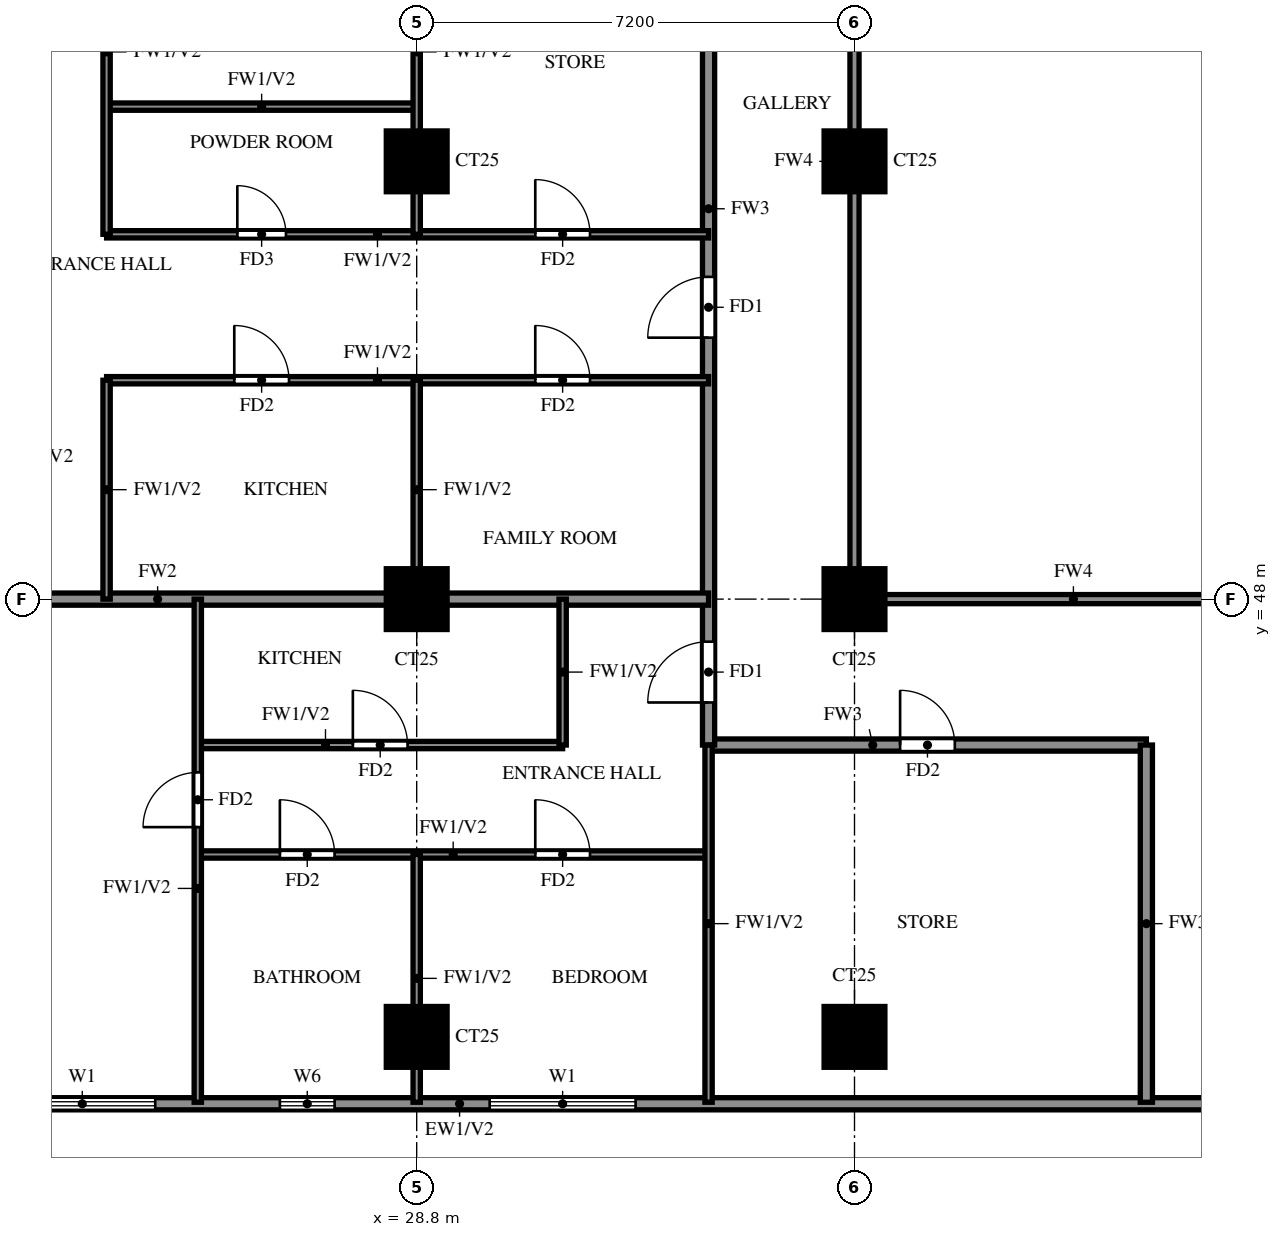
"""IFC4 building model, lengths in metres.
Left out: names, types, materials, properties, quantities, classifications, styles, units other than length and angle.
Written with IfcOpenShell. Run it as: python <this file> out.ifc"""

import sys

from ifc_helpers import new_model, si_unit, direction, frame, frame_2d, origin, origin_2d, place, context, subcontext, project, spatial, rectangle, extrude, source, transform, mapped, element, fill, save


model = new_model("IFC4")
c1 = context("Model", 3, precision=1e-05, world=origin(), true_north=direction((0.0, 1.0)))
c2 = subcontext(c1, "Body", "Model", "MODEL_VIEW")
j1 = project(units=[si_unit("LENGTHUNIT", "METRE"), si_unit("PLANEANGLEUNIT", "RADIAN")], contexts=[c1])
p1 = place(None, origin())
s1 = spatial("IfcSite", under=j1, at=p1, CompositionType="ELEMENT")
p2 = place(p1, origin())
s2 = spatial("IfcBuilding", under=s1, at=p2, CompositionType="ELEMENT")
p3 = place(p2, frame((0.0, 0.0, 143.0)))
s3 = spatial("IfcBuildingStorey", under=s2, at=p3, CompositionType="ELEMENT", Elevation=143.0)
m1 = source(origin(), c2, "Body", "SweptSolid", [
    extrude(rectangle(XDim=1.0, YDim=1.0, at=origin_2d()), origin(), (0.0, 0.0, 1.0), 3.2),
])
for number, where, z_axis, x_axis in (
    (1, (28.8, 40.8, 0.0), (0.0, 0.0, 1.0), (1.0, 0.0, 0.0)),
    (2, (36.0, 40.8, 0.0), (0.0, 0.0, 1.0), (1.0, 0.0, 0.0)),
    (3, (28.8, 48.0, 0.0), (0.0, 0.0, 1.0), (1.0, 0.0, 0.0)),
    (4, (36.0, 48.0, 0.0), (0.0, 0.0, 1.0), (1.0, 0.0, 0.0)),
    (5, (28.8, 55.2, 0.0), (0.0, 0.0, 1.0), (1.0, 0.0, 0.0)),
    (6, (36.0, 55.2, 0.0), (0.0, 0.0, 1.0), (1.0, 0.0, 0.0)),
):
    element("IfcColumn", number, at=place(p3, frame(where, z_axis=z_axis, x_axis=x_axis)), inside=s3, PredefinedType="COLUMN", context=c2, shape_type="MappedRepresentation", body=[
        mapped(m1, transform((0.0, 0.0, 0.0))),
    ])
p4 = place(p3, frame((18.2, 39.7, 0.0), z_axis=(0.0, 0.0, 1.0), x_axis=(1.0, 0.0, 0.0)))
e7 = element("IfcWall", 7, at=p4, inside=s3, PredefinedType="SOLIDWALL", context=c2, shape_type="SweptSolid", body=[
    extrude(rectangle(XDim=23.8, YDim=0.2, at=frame_2d((11.9, 0.0))), origin(), (0.0, 0.0, 1.0), 3.2),
])
p5 = place(p4, frame((0.9, 0.0, 0.6)))
e8 = element("IfcOpeningElement", 8, at=p5, cuts=e7, PredefinedType="OPENING", context=c2, shape_type="SweptSolid", body=[
    extrude(rectangle(XDim=2.4, YDim=2.4, at=frame_2d((1.2, 1.2))), frame((0.0, 0.11, 0.0), z_axis=(0.0, -1.0, 0.0), x_axis=(1.0, 0.0, 0.0)), (0.0, 0.0, 1.0), 0.22),
])
p6 = place(p4, frame((3.9, 0.0, 0.6)))
e9 = element("IfcOpeningElement", 9, at=p6, cuts=e7, PredefinedType="OPENING", context=c2, shape_type="SweptSolid", body=[
    extrude(rectangle(XDim=2.4, YDim=2.4, at=frame_2d((1.2, 1.2))), frame((0.0, 0.11, 0.0), z_axis=(0.0, -1.0, 0.0), x_axis=(1.0, 0.0, 0.0)), (0.0, 0.0, 1.0), 0.22),
])
p7 = place(p4, frame((8.35, 0.0, 1.5)))
e10 = element("IfcOpeningElement", 10, at=p7, cuts=e7, PredefinedType="OPENING", context=c2, shape_type="SweptSolid", body=[
    extrude(rectangle(XDim=0.9, YDim=0.9, at=frame_2d((0.45, 0.45))), frame((0.0, 0.11, 0.0), z_axis=(0.0, -1.0, 0.0), x_axis=(1.0, 0.0, 0.0)), (0.0, 0.0, 1.0), 0.22),
])
p8 = place(p4, frame((11.8, 0.0, 0.6)))
e11 = element("IfcOpeningElement", 11, at=p8, cuts=e7, PredefinedType="OPENING", context=c2, shape_type="SweptSolid", body=[
    extrude(rectangle(XDim=2.4, YDim=2.4, at=frame_2d((1.2, 1.2))), frame((0.0, 0.11, 0.0), z_axis=(0.0, -1.0, 0.0), x_axis=(1.0, 0.0, 0.0)), (0.0, 0.0, 1.0), 0.22),
])
p9 = place(p3, frame((33.6, 45.6, 0.0), z_axis=(0.0, 0.0, 1.0), x_axis=(1.0, 0.0, 0.0)))
e12 = element("IfcWall", 12, at=p9, inside=s3, PredefinedType="SOLIDWALL", context=c2, shape_type="SweptSolid", body=[
    extrude(rectangle(XDim=7.2, YDim=0.2, at=frame_2d((3.6, 0.0))), origin(), (0.0, 0.0, 1.0), 3.2),
])
p10 = place(p9, frame((3.15, 0.0, 0.0)))
e13 = element("IfcOpeningElement", 13, at=p10, cuts=e12, PredefinedType="OPENING", context=c2, shape_type="SweptSolid", body=[
    extrude(rectangle(XDim=0.9, YDim=2.1, at=frame_2d((0.45, 1.05))), frame((0.0, 0.11, 0.0), z_axis=(0.0, -1.0, 0.0), x_axis=(1.0, 0.0, 0.0)), (0.0, 0.0, 1.0), 0.22),
])
p11 = place(p3, frame((33.6, 45.6, 0.0), z_axis=(0.0, 0.0, 1.0), x_axis=(0.0, 1.0, 0.0)))
e14 = element("IfcWall", 14, at=p11, inside=s3, PredefinedType="SOLIDWALL", context=c2, shape_type="SweptSolid", body=[
    extrude(rectangle(XDim=16.8, YDim=0.2, at=frame_2d((8.4, 0.0))), origin(), (0.0, 0.0, 1.0), 3.2),
])
p12 = place(p11, frame((0.7, 0.0, 0.0)))
e15 = element("IfcOpeningElement", 15, at=p12, cuts=e14, PredefinedType="OPENING", context=c2, shape_type="SweptSolid", body=[
    extrude(rectangle(XDim=1.0, YDim=2.1, at=frame_2d((0.5, 1.05))), frame((0.0, 0.11, 0.0), z_axis=(0.0, -1.0, 0.0), x_axis=(1.0, 0.0, 0.0)), (0.0, 0.0, 1.0), 0.22),
])
p13 = place(p11, frame((6.7, 0.0, 0.0)))
e16 = element("IfcOpeningElement", 16, at=p13, cuts=e14, PredefinedType="OPENING", context=c2, shape_type="SweptSolid", body=[
    extrude(rectangle(XDim=1.0, YDim=2.1, at=frame_2d((0.5, 1.05))), frame((0.0, 0.11, 0.0), z_axis=(0.0, -1.0, 0.0), x_axis=(1.0, 0.0, 0.0)), (0.0, 0.0, 1.0), 0.22),
])
p14 = place(p11, frame((15.1, 0.0, 0.0)))
e17 = element("IfcOpeningElement", 17, at=p14, cuts=e14, PredefinedType="OPENING", context=c2, shape_type="SweptSolid", body=[
    extrude(rectangle(XDim=1.0, YDim=2.1, at=frame_2d((0.5, 1.05))), frame((0.0, 0.11, 0.0), z_axis=(0.0, -1.0, 0.0), x_axis=(1.0, 0.0, 0.0)), (0.0, 0.0, 1.0), 0.22),
])
p15 = place(p3, frame((40.8, 39.725, 0.0), z_axis=(0.0, 0.0, 1.0), x_axis=(0.0, 1.0, 0.0)))
e18 = element("IfcWall", 18, at=p15, inside=s3, PredefinedType="SOLIDWALL", context=c2, shape_type="SweptSolid", body=[
    extrude(rectangle(XDim=5.875, YDim=0.2, at=frame_2d((2.938, 0.0))), origin(), (0.0, 0.0, 1.0), 3.2),
])
p16 = place(p3, frame((14.525, 48.0, 0.0), z_axis=(0.0, 0.0, 1.0), x_axis=(1.0, 0.0, 0.0)))
e19 = element("IfcWall", 19, at=p16, inside=s3, PredefinedType="SOLIDWALL", context=c2, shape_type="SweptSolid", body=[
    extrude(rectangle(XDim=19.075, YDim=0.2, at=frame_2d((9.538, 0.0))), origin(), (0.0, 0.0, 1.0), 3.2),
])
p17 = place(p3, frame((25.2, 43.8, 0.0), z_axis=(0.0, 0.0, 1.0), x_axis=(1.0, 0.0, 0.0)))
e20 = element("IfcWall", 20, at=p17, inside=s3, PredefinedType="PARTITIONING", context=c2, shape_type="SweptSolid", body=[
    extrude(rectangle(XDim=8.4, YDim=0.12, at=frame_2d((4.2, 0.0))), origin(), (0.0, 0.0, 1.0), 3.2),
])
p18 = place(p17, frame((1.35, 0.0, 0.0)))
e21 = element("IfcOpeningElement", 21, at=p18, cuts=e20, PredefinedType="OPENING", context=c2, shape_type="SweptSolid", body=[
    extrude(rectangle(XDim=0.9, YDim=2.1, at=frame_2d((0.45, 1.05))), frame((0.0, 0.07, 0.0), z_axis=(0.0, -1.0, 0.0), x_axis=(1.0, 0.0, 0.0)), (0.0, 0.0, 1.0), 0.14),
])
p19 = place(p17, frame((5.55, 0.0, 0.0)))
e22 = element("IfcOpeningElement", 22, at=p19, cuts=e20, PredefinedType="OPENING", context=c2, shape_type="SweptSolid", body=[
    extrude(rectangle(XDim=0.9, YDim=2.1, at=frame_2d((0.45, 1.05))), frame((0.0, 0.07, 0.0), z_axis=(0.0, -1.0, 0.0), x_axis=(1.0, 0.0, 0.0)), (0.0, 0.0, 1.0), 0.14),
])
p20 = place(p3, frame((25.2, 45.6, 0.0), z_axis=(0.0, 0.0, 1.0), x_axis=(1.0, 0.0, 0.0)))
e23 = element("IfcWall", 23, at=p20, inside=s3, PredefinedType="PARTITIONING", context=c2, shape_type="SweptSolid", body=[
    extrude(rectangle(XDim=6.0, YDim=0.12, at=frame_2d((3.0, 0.0))), origin(), (0.0, 0.0, 1.0), 3.2),
])
p21 = place(p20, frame((2.55, 0.0, 0.0)))
e24 = element("IfcOpeningElement", 24, at=p21, cuts=e23, PredefinedType="OPENING", context=c2, shape_type="SweptSolid", body=[
    extrude(rectangle(XDim=0.9, YDim=2.1, at=frame_2d((0.45, 1.05))), frame((0.0, 0.07, 0.0), z_axis=(0.0, -1.0, 0.0), x_axis=(1.0, 0.0, 0.0)), (0.0, 0.0, 1.0), 0.14),
])
p22 = place(p3, frame((23.7, 51.6, 0.0), z_axis=(0.0, 0.0, 1.0), x_axis=(1.0, 0.0, 0.0)))
e25 = element("IfcWall", 25, at=p22, inside=s3, PredefinedType="PARTITIONING", context=c2, shape_type="SweptSolid", body=[
    extrude(rectangle(XDim=9.9, YDim=0.12, at=frame_2d((4.95, 0.0))), origin(), (0.0, 0.0, 1.0), 3.2),
])
p23 = place(p22, frame((2.1, 0.0, 0.0)))
e26 = element("IfcOpeningElement", 26, at=p23, cuts=e25, PredefinedType="OPENING", context=c2, shape_type="SweptSolid", body=[
    extrude(rectangle(XDim=0.9, YDim=2.1, at=frame_2d((0.45, 1.05))), frame((0.0, 0.07, 0.0), z_axis=(0.0, -1.0, 0.0), x_axis=(1.0, 0.0, 0.0)), (0.0, 0.0, 1.0), 0.14),
])
p24 = place(p22, frame((7.05, 0.0, 0.0)))
e27 = element("IfcOpeningElement", 27, at=p24, cuts=e25, PredefinedType="OPENING", context=c2, shape_type="SweptSolid", body=[
    extrude(rectangle(XDim=0.9, YDim=2.1, at=frame_2d((0.45, 1.05))), frame((0.0, 0.07, 0.0), z_axis=(0.0, -1.0, 0.0), x_axis=(1.0, 0.0, 0.0)), (0.0, 0.0, 1.0), 0.14),
])
p25 = place(p3, frame((23.7, 54.0, 0.0), z_axis=(0.0, 0.0, 1.0), x_axis=(1.0, 0.0, 0.0)))
e28 = element("IfcWall", 28, at=p25, inside=s3, PredefinedType="PARTITIONING", context=c2, shape_type="SweptSolid", body=[
    extrude(rectangle(XDim=9.9, YDim=0.12, at=frame_2d((4.95, 0.0))), origin(), (0.0, 0.0, 1.0), 3.2),
])
p26 = place(p25, frame((2.15, 0.0, 0.0)))
e29 = element("IfcOpeningElement", 29, at=p26, cuts=e28, PredefinedType="OPENING", context=c2, shape_type="SweptSolid", body=[
    extrude(rectangle(XDim=0.8, YDim=2.1, at=frame_2d((0.4, 1.05))), frame((0.0, 0.07, 0.0), z_axis=(0.0, -1.0, 0.0), x_axis=(1.0, 0.0, 0.0)), (0.0, 0.0, 1.0), 0.14),
])
p27 = place(p25, frame((7.05, 0.0, 0.0)))
e30 = element("IfcOpeningElement", 30, at=p27, cuts=e28, PredefinedType="OPENING", context=c2, shape_type="SweptSolid", body=[
    extrude(rectangle(XDim=0.9, YDim=2.1, at=frame_2d((0.45, 1.05))), frame((0.0, 0.07, 0.0), z_axis=(0.0, -1.0, 0.0), x_axis=(1.0, 0.0, 0.0)), (0.0, 0.0, 1.0), 0.14),
])
p28 = place(p3, frame((23.7, 56.1, 0.0), z_axis=(0.0, 0.0, 1.0), x_axis=(1.0, 0.0, 0.0)))
e31 = element("IfcWall", 31, at=p28, inside=s3, PredefinedType="PARTITIONING", context=c2, shape_type="SweptSolid", body=[
    extrude(rectangle(XDim=5.1, YDim=0.12, at=frame_2d((2.55, 0.0))), origin(), (0.0, 0.0, 1.0), 3.2),
])
p29 = place(p3, frame((23.7, 48.0, 0.0), z_axis=(0.0, 0.0, 1.0), x_axis=(0.0, 1.0, 0.0)))
e32 = element("IfcWall", 32, at=p29, inside=s3, PredefinedType="PARTITIONING", context=c2, shape_type="SweptSolid", body=[
    extrude(rectangle(XDim=3.6, YDim=0.12, at=frame_2d((1.8, 0.0))), origin(), (0.0, 0.0, 1.0), 3.2),
])
p30 = place(p3, frame((23.7, 54.0, 0.0), z_axis=(0.0, 0.0, 1.0), x_axis=(0.0, 1.0, 0.0)))
e33 = element("IfcWall", 33, at=p30, inside=s3, PredefinedType="PARTITIONING", context=c2, shape_type="SweptSolid", body=[
    extrude(rectangle(XDim=6.0, YDim=0.12, at=frame_2d((3.0, 0.0))), origin(), (0.0, 0.0, 1.0), 3.2),
])
p31 = place(p30, frame((3.65, 0.0, 0.0)))
e34 = element("IfcOpeningElement", 34, at=p31, cuts=e33, PredefinedType="OPENING", context=c2, shape_type="SweptSolid", body=[
    extrude(rectangle(XDim=0.8, YDim=2.1, at=frame_2d((0.4, 1.05))), frame((0.0, 0.07, 0.0), z_axis=(0.0, -1.0, 0.0), x_axis=(1.0, 0.0, 0.0)), (0.0, 0.0, 1.0), 0.14),
])
p32 = place(p3, frame((25.2, 39.725, 0.0), z_axis=(0.0, 0.0, 1.0), x_axis=(0.0, 1.0, 0.0)))
e35 = element("IfcWall", 35, at=p32, inside=s3, PredefinedType="PARTITIONING", context=c2, shape_type="SweptSolid", body=[
    extrude(rectangle(XDim=8.275, YDim=0.12, at=frame_2d((4.137, 0.0))), origin(), (0.0, 0.0, 1.0), 3.2),
])
p33 = place(p32, frame((4.525, 0.0, 0.0)))
e36 = element("IfcOpeningElement", 36, at=p33, cuts=e35, PredefinedType="OPENING", context=c2, shape_type="SweptSolid", body=[
    extrude(rectangle(XDim=0.9, YDim=2.1, at=frame_2d((0.45, 1.05))), frame((0.0, 0.07, 0.0), z_axis=(0.0, -1.0, 0.0), x_axis=(1.0, 0.0, 0.0)), (0.0, 0.0, 1.0), 0.14),
])
p34 = place(p3, frame((28.8, 39.725, 0.0), z_axis=(0.0, 0.0, 1.0), x_axis=(0.0, 1.0, 0.0)))
e37 = element("IfcWall", 37, at=p34, inside=s3, PredefinedType="PARTITIONING", context=c2, shape_type="SweptSolid", body=[
    extrude(rectangle(XDim=4.075, YDim=0.12, at=frame_2d((2.038, 0.0))), origin(), (0.0, 0.0, 1.0), 3.2),
])
p35 = place(p3, frame((28.8, 48.0, 0.0), z_axis=(0.0, 0.0, 1.0), x_axis=(0.0, 1.0, 0.0)))
e38 = element("IfcWall", 38, at=p35, inside=s3, PredefinedType="PARTITIONING", context=c2, shape_type="SweptSolid", body=[
    extrude(rectangle(XDim=3.6, YDim=0.12, at=frame_2d((1.8, 0.0))), origin(), (0.0, 0.0, 1.0), 3.2),
])
p36 = place(p3, frame((28.8, 54.0, 0.0), z_axis=(0.0, 0.0, 1.0), x_axis=(0.0, 1.0, 0.0)))
e39 = element("IfcWall", 39, at=p36, inside=s3, PredefinedType="PARTITIONING", context=c2, shape_type="SweptSolid", body=[
    extrude(rectangle(XDim=6.0, YDim=0.12, at=frame_2d((3.0, 0.0))), origin(), (0.0, 0.0, 1.0), 3.2),
])
p37 = place(p3, frame((31.2, 45.6, 0.0), z_axis=(0.0, 0.0, 1.0), x_axis=(0.0, 1.0, 0.0)))
e40 = element("IfcWall", 40, at=p37, inside=s3, PredefinedType="PARTITIONING", context=c2, shape_type="SweptSolid", body=[
    extrude(rectangle(XDim=2.4, YDim=0.12, at=frame_2d((1.2, 0.0))), origin(), (0.0, 0.0, 1.0), 3.2),
])
p38 = place(p3, frame((33.6, 39.725, 0.0), z_axis=(0.0, 0.0, 1.0), x_axis=(0.0, 1.0, 0.0)))
e41 = element("IfcWall", 41, at=p38, inside=s3, PredefinedType="PARTITIONING", context=c2, shape_type="SweptSolid", body=[
    extrude(rectangle(XDim=5.875, YDim=0.12, at=frame_2d((2.938, 0.0))), origin(), (0.0, 0.0, 1.0), 3.2),
])
p39 = place(p3, frame((36.0, 48.0, 0.0), z_axis=(0.0, 0.0, 1.0), x_axis=(1.0, 0.0, 0.0)))
e42 = element("IfcWall", 42, at=p39, inside=s3, PredefinedType="SOLIDWALL", context=c2, shape_type="SweptSolid", body=[
    extrude(rectangle(XDim=7.2, YDim=0.15, at=frame_2d((3.6, 0.0))), origin(), (0.0, 0.0, 1.0), 2.3),
])
p40 = place(p3, frame((36.0, 48.0, 0.0), z_axis=(0.0, 0.0, 1.0), x_axis=(0.0, 1.0, 0.0)))
e43 = element("IfcWall", 43, at=p40, inside=s3, PredefinedType="SOLIDWALL", context=c2, shape_type="SweptSolid", body=[
    extrude(rectangle(XDim=14.4, YDim=0.15, at=frame_2d((7.2, 0.0))), origin(), (0.0, 0.0, 1.0), 2.3),
])
p41 = place(p6, origin())
e44 = element("IfcWindow", 44, at=p41, inside=s3, PartitioningType="DOUBLE_PANEL_VERTICAL", PredefinedType="WINDOW", context=c2, shape_type="SweptSolid", body=[
    extrude(rectangle(XDim=2.4, YDim=2.4, at=frame_2d((1.2, 1.2))), frame((0.0, 0.03, 0.0), z_axis=(0.0, -1.0, 0.0), x_axis=(1.0, 0.0, 0.0)), (0.0, 0.0, 1.0), 0.06),
])
fill(e9, e44)
p42 = place(p7, origin())
e45 = element("IfcWindow", 45, at=p42, inside=s3, PartitioningType="SINGLE_PANEL", PredefinedType="WINDOW", context=c2, shape_type="SweptSolid", body=[
    extrude(rectangle(XDim=0.9, YDim=0.9, at=frame_2d((0.45, 0.45))), frame((0.0, 0.03, 0.0), z_axis=(0.0, -1.0, 0.0), x_axis=(1.0, 0.0, 0.0)), (0.0, 0.0, 1.0), 0.06),
])
fill(e10, e45)
p43 = place(p8, origin())
e46 = element("IfcWindow", 46, at=p43, inside=s3, PartitioningType="DOUBLE_PANEL_VERTICAL", PredefinedType="WINDOW", context=c2, shape_type="SweptSolid", body=[
    extrude(rectangle(XDim=2.4, YDim=2.4, at=frame_2d((1.2, 1.2))), frame((0.0, 0.03, 0.0), z_axis=(0.0, -1.0, 0.0), x_axis=(1.0, 0.0, 0.0)), (0.0, 0.0, 1.0), 0.06),
])
fill(e11, e46)
p44 = place(p12, origin())
e47 = element("IfcDoor", 47, at=p44, inside=s3, OperationType="SINGLE_SWING_LEFT", PredefinedType="DOOR", context=c2, shape_type="SweptSolid", body=[
    extrude(rectangle(XDim=1.0, YDim=2.1, at=frame_2d((0.5, 1.05))), frame((0.0, 0.025, 0.0), z_axis=(0.0, -1.0, 0.0), x_axis=(1.0, 0.0, 0.0)), (0.0, 0.0, 1.0), 0.05),
])
fill(e15, e47)
p45 = place(p33, origin())
e48 = element("IfcDoor", 48, at=p45, inside=s3, OperationType="SINGLE_SWING_LEFT", PredefinedType="DOOR", context=c2, shape_type="SweptSolid", body=[
    extrude(rectangle(XDim=0.9, YDim=2.1, at=frame_2d((0.45, 1.05))), frame((0.0, 0.025, 0.0), z_axis=(0.0, -1.0, 0.0), x_axis=(1.0, 0.0, 0.0)), (0.0, 0.0, 1.0), 0.05),
])
fill(e36, e48)
p46 = place(p18, origin())
e49 = element("IfcDoor", 49, at=p46, inside=s3, OperationType="SINGLE_SWING_RIGHT", PredefinedType="DOOR", context=c2, shape_type="SweptSolid", body=[
    extrude(rectangle(XDim=0.9, YDim=2.1, at=frame_2d((0.45, 1.05))), frame((0.0, 0.025, 0.0), z_axis=(0.0, -1.0, 0.0), x_axis=(1.0, 0.0, 0.0)), (0.0, 0.0, 1.0), 0.05),
])
fill(e21, e49)
p47 = place(p19, origin())
e50 = element("IfcDoor", 50, at=p47, inside=s3, OperationType="SINGLE_SWING_LEFT", PredefinedType="DOOR", context=c2, shape_type="SweptSolid", body=[
    extrude(rectangle(XDim=0.9, YDim=2.1, at=frame_2d((0.45, 1.05))), frame((0.0, 0.025, 0.0), z_axis=(0.0, -1.0, 0.0), x_axis=(1.0, 0.0, 0.0)), (0.0, 0.0, 1.0), 0.05),
])
fill(e22, e50)
p48 = place(p21, origin())
e51 = element("IfcDoor", 51, at=p48, inside=s3, OperationType="SINGLE_SWING_LEFT", PredefinedType="DOOR", context=c2, shape_type="SweptSolid", body=[
    extrude(rectangle(XDim=0.9, YDim=2.1, at=frame_2d((0.45, 1.05))), frame((0.0, 0.025, 0.0), z_axis=(0.0, -1.0, 0.0), x_axis=(1.0, 0.0, 0.0)), (0.0, 0.0, 1.0), 0.05),
])
fill(e24, e51)
p49 = place(p10, origin())
e52 = element("IfcDoor", 52, at=p49, inside=s3, OperationType="SINGLE_SWING_RIGHT", PredefinedType="DOOR", context=c2, shape_type="SweptSolid", body=[
    extrude(rectangle(XDim=0.9, YDim=2.1, at=frame_2d((0.45, 1.05))), frame((0.0, 0.025, 0.0), z_axis=(0.0, -1.0, 0.0), x_axis=(1.0, 0.0, 0.0)), (0.0, 0.0, 1.0), 0.05),
])
fill(e13, e52)
p50 = place(p13, origin())
e53 = element("IfcDoor", 53, at=p50, inside=s3, OperationType="SINGLE_SWING_LEFT", PredefinedType="DOOR", context=c2, shape_type="SweptSolid", body=[
    extrude(rectangle(XDim=1.0, YDim=2.1, at=frame_2d((0.5, 1.05))), frame((0.0, 0.025, 0.0), z_axis=(0.0, -1.0, 0.0), x_axis=(1.0, 0.0, 0.0)), (0.0, 0.0, 1.0), 0.05),
])
fill(e16, e53)
p51 = place(p23, origin())
e54 = element("IfcDoor", 54, at=p51, inside=s3, OperationType="SINGLE_SWING_LEFT", PredefinedType="DOOR", context=c2, shape_type="SweptSolid", body=[
    extrude(rectangle(XDim=0.9, YDim=2.1, at=frame_2d((0.45, 1.05))), frame((0.0, 0.025, 0.0), z_axis=(0.0, -1.0, 0.0), x_axis=(1.0, 0.0, 0.0)), (0.0, 0.0, 1.0), 0.05),
])
fill(e26, e54)
p52 = place(p26, origin())
e55 = element("IfcDoor", 55, at=p52, inside=s3, OperationType="SINGLE_SWING_RIGHT", PredefinedType="DOOR", context=c2, shape_type="SweptSolid", body=[
    extrude(rectangle(XDim=0.8, YDim=2.1, at=frame_2d((0.4, 1.05))), frame((0.0, 0.025, 0.0), z_axis=(0.0, -1.0, 0.0), x_axis=(1.0, 0.0, 0.0)), (0.0, 0.0, 1.0), 0.05),
])
fill(e29, e55)
p53 = place(p24, origin())
e56 = element("IfcDoor", 56, at=p53, inside=s3, OperationType="SINGLE_SWING_LEFT", PredefinedType="DOOR", context=c2, shape_type="SweptSolid", body=[
    extrude(rectangle(XDim=0.9, YDim=2.1, at=frame_2d((0.45, 1.05))), frame((0.0, 0.025, 0.0), z_axis=(0.0, -1.0, 0.0), x_axis=(1.0, 0.0, 0.0)), (0.0, 0.0, 1.0), 0.05),
])
fill(e27, e56)
p54 = place(p27, origin())
e57 = element("IfcDoor", 57, at=p54, inside=s3, OperationType="SINGLE_SWING_RIGHT", PredefinedType="DOOR", context=c2, shape_type="SweptSolid", body=[
    extrude(rectangle(XDim=0.9, YDim=2.1, at=frame_2d((0.45, 1.05))), frame((0.0, 0.025, 0.0), z_axis=(0.0, -1.0, 0.0), x_axis=(1.0, 0.0, 0.0)), (0.0, 0.0, 1.0), 0.05),
])
fill(e30, e57)
save(model, sys.argv[1])
